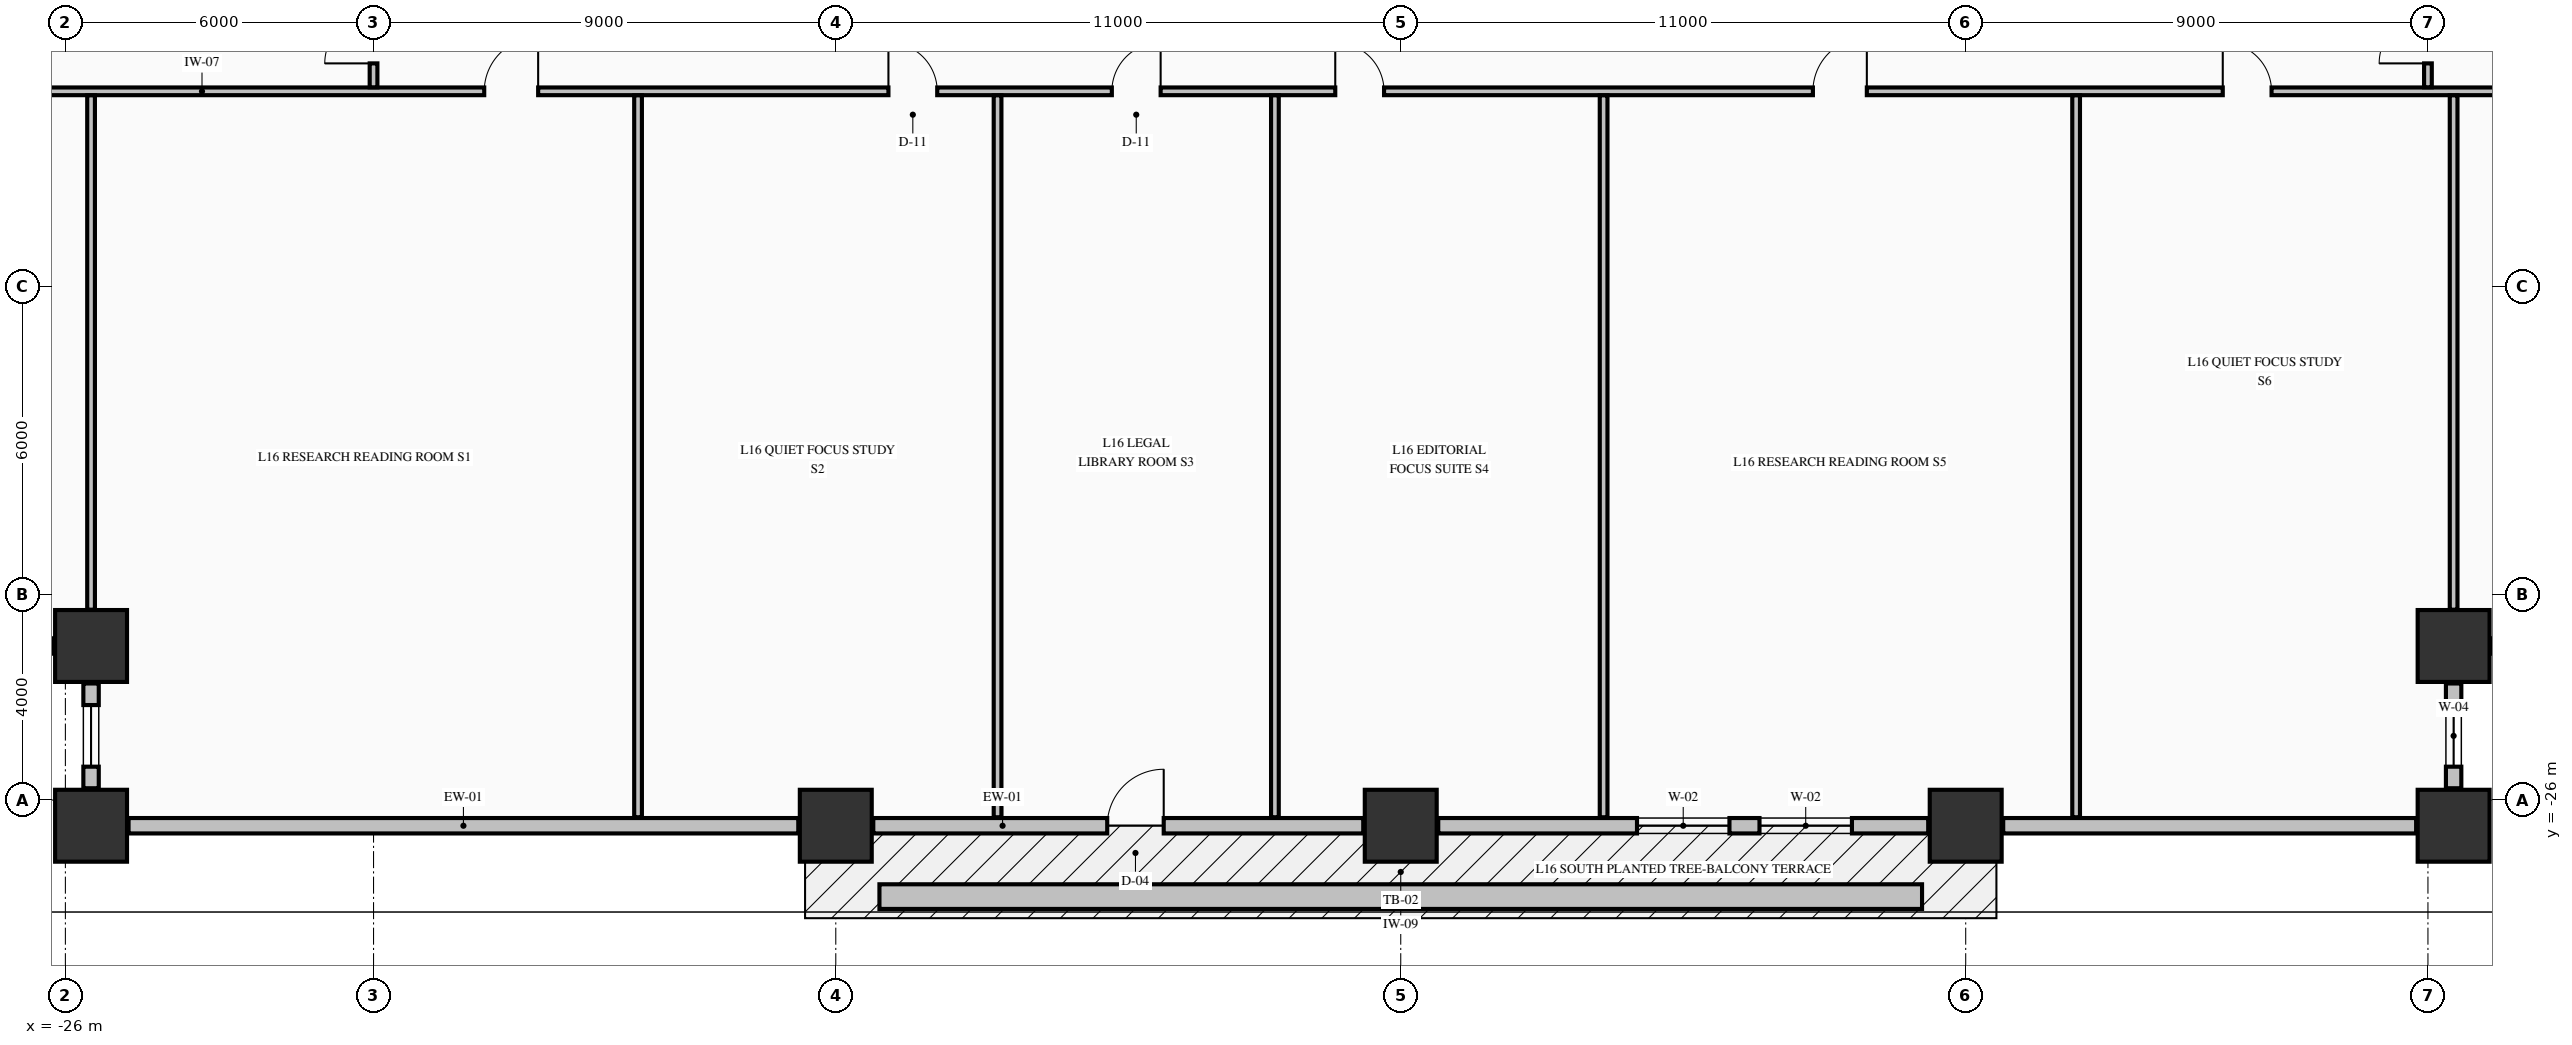
"""IFC4 building model, lengths in metres.
Left out: names, types, materials, properties, quantities, classifications, styles, units other than length and angle.
Written with IfcOpenShell. Run it as: python <this file> out.ifc"""

import sys

from ifc_helpers import new_model, si_unit, direction, frame, frame_2d, origin, origin_2d, place, context, subcontext, project, spatial, rectangle, extrude, element, fill, save


model = new_model("IFC4")
c1 = context("Model", 3, precision=1e-05, world=origin(), true_north=direction((0.0, 1.0)))
c2 = subcontext(c1, "Body", "Model", "MODEL_VIEW")
j1 = project(units=[si_unit("LENGTHUNIT", "METRE"), si_unit("PLANEANGLEUNIT", "RADIAN")], contexts=[c1])
p1 = place(None, origin())
s1 = spatial("IfcSite", under=j1, at=p1, CompositionType="ELEMENT")
p2 = place(p1, origin())
s2 = spatial("IfcBuilding", under=s1, at=p2, CompositionType="ELEMENT")
p3 = place(p2, frame((0.0, 0.0, 67.9)))
s3 = spatial("IfcBuildingStorey", under=s2, at=p3, CompositionType="ELEMENT", Elevation=67.9)
for number, where, z_axis, x_axis in (
    (1, (-25.5, -26.5, -0.25), (0.0, 0.0, 1.0), (1.0, 0.0, 0.0)),
    (2, (-11.0, -26.5, -0.25), (0.0, 0.0, 1.0), (1.0, 0.0, 0.0)),
    (3, (0.0, -26.5, -0.25), (0.0, 0.0, 1.0), (1.0, 0.0, 0.0)),
    (4, (11.0, -26.5, -0.25), (0.0, 0.0, 1.0), (1.0, 0.0, 0.0)),
    (5, (20.5, -26.5, -0.25), (0.0, 0.0, 1.0), (1.0, 0.0, 0.0)),
    (6, (-25.5, -23.0, -0.25), (0.0, 0.0, 1.0), (1.0, 0.0, 0.0)),
    (7, (20.5, -23.0, -0.25), (0.0, 0.0, 1.0), (1.0, 0.0, 0.0)),
):
    element("IfcColumn", number, at=place(p3, frame(where, z_axis=z_axis, x_axis=x_axis)), inside=s3, PredefinedType="COLUMN", context=c2, shape_type="SweptSolid", body=[
        extrude(rectangle(XDim=1.4, YDim=1.4, at=origin_2d()), origin(), (0.0, 0.0, 1.0), 3.495),
    ])
p4 = place(p3, frame((20.5, -25.77, 0.0), z_axis=(0.0, 0.0, 1.0), x_axis=(0.0, 1.0, 0.0)))
e8 = element("IfcWall", 8, at=p4, inside=s3, PredefinedType="STANDARD", context=c2, shape_type="SweptSolid", body=[
    extrude(rectangle(XDim=2.04, YDim=0.3, at=frame_2d((1.02, 0.0))), origin(), (0.0, 0.0, 1.0), 2.637),
])
p5 = place(p4, frame((0.42, 0.0, 0.82)))
e9 = element("IfcOpeningElement", 9, at=p5, cuts=e8, PredefinedType="OPENING", context=c2, shape_type="SweptSolid", body=[
    extrude(rectangle(XDim=1.2, YDim=1.65, at=frame_2d((0.6, 0.825))), frame((0.0, 0.16, 0.0), z_axis=(0.0, -1.0, 0.0), x_axis=(1.0, 0.0, 0.0)), (0.0, 0.0, 1.0), 0.32),
])
p6 = place(p3, frame((21.23, -23.0, 0.0), z_axis=(0.0, 0.0, 1.0), x_axis=(1.0, 0.0, 0.0)))
e10 = element("IfcWall", 10, at=p6, inside=s3, PredefinedType="STANDARD", context=c2, shape_type="SweptSolid", body=[
    extrude(rectangle(XDim=2.04, YDim=0.3, at=frame_2d((1.02, 0.0))), origin(), (0.0, 0.0, 1.0), 2.637),
])
p7 = place(p6, frame((0.42, 0.0, 0.82)))
e11 = element("IfcOpeningElement", 11, at=p7, cuts=e10, PredefinedType="OPENING", context=c2, shape_type="SweptSolid", body=[
    extrude(rectangle(XDim=1.2, YDim=1.65, at=frame_2d((0.6, 0.825))), frame((0.0, 0.16, 0.0), z_axis=(0.0, -1.0, 0.0), x_axis=(1.0, 0.0, 0.0)), (0.0, 0.0, 1.0), 0.32),
])
p8 = place(p3, frame((-28.27, -23.0, 0.0), z_axis=(0.0, 0.0, 1.0), x_axis=(1.0, 0.0, 0.0)))
e12 = element("IfcWall", 12, at=p8, inside=s3, PredefinedType="STANDARD", context=c2, shape_type="SweptSolid", body=[
    extrude(rectangle(XDim=2.04, YDim=0.3, at=frame_2d((1.02, 0.0))), origin(), (0.0, 0.0, 1.0), 2.637),
])
p9 = place(p8, frame((0.42, 0.0, 0.82)))
e13 = element("IfcOpeningElement", 13, at=p9, cuts=e12, PredefinedType="OPENING", context=c2, shape_type="SweptSolid", body=[
    extrude(rectangle(XDim=1.2, YDim=1.65, at=frame_2d((0.6, 0.825))), frame((0.0, 0.16, 0.0), z_axis=(0.0, -1.0, 0.0), x_axis=(1.0, 0.0, 0.0)), (0.0, 0.0, 1.0), 0.32),
])
p10 = place(p3, frame((-25.5, -23.73, 0.0), z_axis=(0.0, 0.0, 1.0), x_axis=(0.0, -1.0, 0.0)))
e14 = element("IfcWall", 14, at=p10, inside=s3, PredefinedType="STANDARD", context=c2, shape_type="SweptSolid", body=[
    extrude(rectangle(XDim=2.04, YDim=0.3, at=frame_2d((1.02, 0.0))), origin(), (0.0, 0.0, 1.0), 2.637),
])
p11 = place(p10, frame((0.42, 0.0, 0.82)))
e15 = element("IfcOpeningElement", 15, at=p11, cuts=e14, PredefinedType="OPENING", context=c2, shape_type="SweptSolid", body=[
    extrude(rectangle(XDim=1.2, YDim=1.65, at=frame_2d((0.6, 0.825))), frame((0.0, 0.16, 0.0), z_axis=(0.0, -1.0, 0.0), x_axis=(1.0, 0.0, 0.0)), (0.0, 0.0, 1.0), 0.32),
])
p12 = place(p3, frame((-24.77, -26.5, 0.0), z_axis=(0.0, 0.0, 1.0), x_axis=(1.0, 0.0, 0.0)))
e16 = element("IfcWall", 16, at=p12, inside=s3, PredefinedType="STANDARD", context=c2, shape_type="SweptSolid", body=[
    extrude(rectangle(XDim=13.04, YDim=0.3, at=frame_2d((6.52, 0.0))), origin(), (0.0, 0.0, 1.0), 2.637),
])
p13 = place(p3, frame((-10.27, -26.5, 0.0), z_axis=(0.0, 0.0, 1.0), x_axis=(1.0, 0.0, 0.0)))
e17 = element("IfcWall", 17, at=p13, inside=s3, PredefinedType="STANDARD", context=c2, shape_type="SweptSolid", body=[
    extrude(rectangle(XDim=9.54, YDim=0.3, at=frame_2d((4.77, 0.0))), origin(), (0.0, 0.0, 1.0), 2.637),
])
p14 = place(p13, frame((4.555, 0.0, 0.0)))
e18 = element("IfcOpeningElement", 18, at=p14, cuts=e17, PredefinedType="OPENING", context=c2, shape_type="SweptSolid", body=[
    extrude(rectangle(XDim=1.1, YDim=2.15, at=frame_2d((0.55, 1.075))), frame((0.0, 0.16, 0.0), z_axis=(0.0, -1.0, 0.0), x_axis=(1.0, 0.0, 0.0)), (0.0, 0.0, 1.0), 0.32),
])
p15 = place(p3, frame((0.73, -26.5, 0.0), z_axis=(0.0, 0.0, 1.0), x_axis=(1.0, 0.0, 0.0)))
e19 = element("IfcWall", 19, at=p15, inside=s3, PredefinedType="STANDARD", context=c2, shape_type="SweptSolid", body=[
    extrude(rectangle(XDim=9.54, YDim=0.3, at=frame_2d((4.77, 0.0))), origin(), (0.0, 0.0, 1.0), 2.637),
])
p16 = place(p15, frame((3.87, 0.0, 0.78)))
e20 = element("IfcOpeningElement", 20, at=p16, cuts=e19, PredefinedType="OPENING", context=c2, shape_type="SweptSolid", body=[
    extrude(rectangle(XDim=1.8, YDim=1.72, at=frame_2d((0.9, 0.86))), frame((0.0, 0.16, 0.0), z_axis=(0.0, -1.0, 0.0), x_axis=(1.0, 0.0, 0.0)), (0.0, 0.0, 1.0), 0.32),
])
p17 = place(p15, frame((6.255, 0.0, 0.78)))
e21 = element("IfcOpeningElement", 21, at=p17, cuts=e19, PredefinedType="OPENING", context=c2, shape_type="SweptSolid", body=[
    extrude(rectangle(XDim=1.8, YDim=1.72, at=frame_2d((0.9, 0.86))), frame((0.0, 0.16, 0.0), z_axis=(0.0, -1.0, 0.0), x_axis=(1.0, 0.0, 0.0)), (0.0, 0.0, 1.0), 0.32),
])
p18 = place(p3, frame((11.73, -26.5, 0.0), z_axis=(0.0, 0.0, 1.0), x_axis=(1.0, 0.0, 0.0)))
e22 = element("IfcWall", 22, at=p18, inside=s3, PredefinedType="STANDARD", context=c2, shape_type="SweptSolid", body=[
    extrude(rectangle(XDim=8.04, YDim=0.3, at=frame_2d((4.02, 0.0))), origin(), (0.0, 0.0, 1.0), 2.637),
])
p19 = place(p3, frame((-28.835, -12.2, 0.0), z_axis=(0.0, 0.0, 1.0), x_axis=(1.0, 0.0, 0.0)))
e23 = element("IfcWall", 23, at=p19, inside=s3, PredefinedType="PARTITIONING", context=c2, shape_type="SweptSolid", body=[
    extrude(rectangle(XDim=52.67, YDim=0.15, at=frame_2d((26.335, 0.0))), origin(), (0.0, 0.0, 1.0), 3.245),
])
p20 = place(p19, frame((10.99, 0.0, 0.0)))
e24 = element("IfcOpeningElement", 24, at=p20, cuts=e23, PredefinedType="OPENING", context=c2, shape_type="SweptSolid", body=[
    extrude(rectangle(XDim=1.05, YDim=2.15, at=frame_2d((0.525, 1.075))), frame((0.0, 0.085, 0.0), z_axis=(0.0, -1.0, 0.0), x_axis=(1.0, 0.0, 0.0)), (0.0, 0.0, 1.0), 0.17),
])
p21 = place(p19, frame((18.86, 0.0, 0.0)))
e25 = element("IfcOpeningElement", 25, at=p21, cuts=e23, PredefinedType="OPENING", context=c2, shape_type="SweptSolid", body=[
    extrude(rectangle(XDim=0.95, YDim=2.15, at=frame_2d((0.475, 1.075))), frame((0.0, 0.085, 0.0), z_axis=(0.0, -1.0, 0.0), x_axis=(1.0, 0.0, 0.0)), (0.0, 0.0, 1.0), 0.17),
])
p22 = place(p19, frame((23.21, 0.0, 0.0)))
e26 = element("IfcOpeningElement", 26, at=p22, cuts=e23, PredefinedType="OPENING", context=c2, shape_type="SweptSolid", body=[
    extrude(rectangle(XDim=0.95, YDim=2.15, at=frame_2d((0.475, 1.075))), frame((0.0, 0.085, 0.0), z_axis=(0.0, -1.0, 0.0), x_axis=(1.0, 0.0, 0.0)), (0.0, 0.0, 1.0), 0.17),
])
p23 = place(p19, frame((27.56, 0.0, 0.0)))
e27 = element("IfcOpeningElement", 27, at=p23, cuts=e23, PredefinedType="OPENING", context=c2, shape_type="SweptSolid", body=[
    extrude(rectangle(XDim=0.95, YDim=2.15, at=frame_2d((0.475, 1.075))), frame((0.0, 0.085, 0.0), z_axis=(0.0, -1.0, 0.0), x_axis=(1.0, 0.0, 0.0)), (0.0, 0.0, 1.0), 0.17),
])
p24 = place(p19, frame((36.86, 0.0, 0.0)))
e28 = element("IfcOpeningElement", 28, at=p24, cuts=e23, PredefinedType="OPENING", context=c2, shape_type="SweptSolid", body=[
    extrude(rectangle(XDim=1.05, YDim=2.15, at=frame_2d((0.525, 1.075))), frame((0.0, 0.085, 0.0), z_axis=(0.0, -1.0, 0.0), x_axis=(1.0, 0.0, 0.0)), (0.0, 0.0, 1.0), 0.17),
])
p25 = place(p19, frame((44.84, 0.0, 0.0)))
e29 = element("IfcOpeningElement", 29, at=p25, cuts=e23, PredefinedType="OPENING", context=c2, shape_type="SweptSolid", body=[
    extrude(rectangle(XDim=0.95, YDim=2.15, at=frame_2d((0.475, 1.075))), frame((0.0, 0.085, 0.0), z_axis=(0.0, -1.0, 0.0), x_axis=(1.0, 0.0, 0.0)), (0.0, 0.0, 1.0), 0.17),
])
p26 = place(p3, frame((-25.5, -22.294, 0.0), z_axis=(0.0, 0.0, 1.0), x_axis=(0.0, 1.0, 0.0)))
e30 = element("IfcWall", 30, at=p26, inside=s3, PredefinedType="PARTITIONING", context=c2, shape_type="SweptSolid", body=[
    extrude(rectangle(XDim=10.016, YDim=0.15, at=frame_2d((5.008, 0.0))), origin(), (0.0, 0.0, 1.0), 3.245),
])
p27 = place(p3, frame((-20.0, -12.122, 0.0), z_axis=(0.0, 0.0, 1.0), x_axis=(0.0, 1.0, 0.0)))
e31 = element("IfcWall", 31, at=p27, inside=s3, PredefinedType="PARTITIONING", context=c2, shape_type="SweptSolid", body=[
    extrude(rectangle(XDim=1.566, YDim=0.15, at=frame_2d((0.783, 0.0))), origin(), (0.0, 0.0, 1.0), 2.585),
])
p28 = place(p27, frame((0.466, 0.0, 0.0)))
e32 = element("IfcOpeningElement", 32, at=p28, cuts=e31, PredefinedType="OPENING", context=c2, shape_type="SweptSolid", body=[
    extrude(rectangle(XDim=0.95, YDim=2.15, at=frame_2d((0.475, 1.075))), frame((0.0, 0.085, 0.0), z_axis=(0.0, -1.0, 0.0), x_axis=(1.0, 0.0, 0.0)), (0.0, 0.0, 1.0), 0.17),
])
for number, where, z_axis, x_axis in (
    (33, (-14.85, -26.335, 0.0), (0.0, 0.0, 1.0), (0.0, 1.0, 0.0)),
    (34, (-7.85, -26.335, 0.0), (0.0, 0.0, 1.0), (0.0, 1.0, 0.0)),
    (35, (-2.45, -26.335, 0.0), (0.0, 0.0, 1.0), (0.0, 1.0, 0.0)),
    (36, (3.95, -26.335, 0.0), (0.0, 0.0, 1.0), (0.0, 1.0, 0.0)),
    (37, (13.15, -26.335, 0.0), (0.0, 0.0, 1.0), (0.0, 1.0, 0.0)),
):
    element("IfcWall", number, at=place(p3, frame(where, z_axis=z_axis, x_axis=x_axis)), inside=s3, PredefinedType="PARTITIONING", context=c2, shape_type="SweptSolid", body=[
        extrude(rectangle(XDim=14.057, YDim=0.15, at=frame_2d((7.028, 0.0))), origin(), (0.0, 0.0, 1.0), 3.245),
    ])
p29 = place(p3, frame((20.0, -12.122, 0.0), z_axis=(0.0, 0.0, 1.0), x_axis=(0.0, 1.0, 0.0)))
e38 = element("IfcWall", 38, at=p29, inside=s3, PredefinedType="PARTITIONING", context=c2, shape_type="SweptSolid", body=[
    extrude(rectangle(XDim=1.566, YDim=0.15, at=frame_2d((0.783, 0.0))), origin(), (0.0, 0.0, 1.0), 3.245),
])
p30 = place(p29, frame((0.466, 0.0, 0.0)))
e39 = element("IfcOpeningElement", 39, at=p30, cuts=e38, PredefinedType="OPENING", context=c2, shape_type="SweptSolid", body=[
    extrude(rectangle(XDim=0.95, YDim=2.15, at=frame_2d((0.475, 1.075))), frame((0.0, 0.085, 0.0), z_axis=(0.0, -1.0, 0.0), x_axis=(1.0, 0.0, 0.0)), (0.0, 0.0, 1.0), 0.17),
])
p31 = place(p3, frame((20.5, -22.294, 0.0), z_axis=(0.0, 0.0, 1.0), x_axis=(0.0, 1.0, 0.0)))
e40 = element("IfcWall", 40, at=p31, inside=s3, PredefinedType="PARTITIONING", context=c2, shape_type="SweptSolid", body=[
    extrude(rectangle(XDim=10.016, YDim=0.15, at=frame_2d((5.008, 0.0))), origin(), (0.0, 0.0, 1.0), 3.245),
])
p32 = place(p3, frame((-10.15, -27.88, -0.04), z_axis=(0.0, 0.0, 1.0), x_axis=(1.0, 0.0, 0.0)))
e41 = element("IfcWall", 41, at=p32, inside=s3, PredefinedType="PARAPET", context=c2, shape_type="SweptSolid", body=[
    extrude(rectangle(XDim=20.3, YDim=0.48, at=frame_2d((10.15, 0.0))), origin(), (0.0, 0.0, 1.0), 0.52),
])
p33 = place(p5, origin())
e42 = element("IfcWindow", 42, at=p33, inside=s3, PartitioningType="SINGLE_PANEL", PredefinedType="WINDOW", context=c2, shape_type="SweptSolid", body=[
    extrude(rectangle(XDim=1.2, YDim=1.65, at=frame_2d((0.6, 0.825))), frame((0.0, 0.03, 0.0), z_axis=(0.0, -1.0, 0.0), x_axis=(1.0, 0.0, 0.0)), (0.0, 0.0, 1.0), 0.06),
])
fill(e9, e42)
p34 = place(p11, origin())
e43 = element("IfcWindow", 43, at=p34, inside=s3, PartitioningType="SINGLE_PANEL", PredefinedType="WINDOW", context=c2, shape_type="SweptSolid", body=[
    extrude(rectangle(XDim=1.2, YDim=1.65, at=frame_2d((0.6, 0.825))), frame((0.0, 0.03, 0.0), z_axis=(0.0, -1.0, 0.0), x_axis=(1.0, 0.0, 0.0)), (0.0, 0.0, 1.0), 0.06),
])
fill(e15, e43)
p35 = place(p14, origin())
e44 = element("IfcDoor", 44, at=p35, inside=s3, OperationType="SINGLE_SWING_RIGHT", PredefinedType="DOOR", context=c2, shape_type="SweptSolid", body=[
    extrude(rectangle(XDim=1.1, YDim=2.15, at=frame_2d((0.55, 1.075))), frame((0.0, 0.025, 0.0), z_axis=(0.0, -1.0, 0.0), x_axis=(1.0, 0.0, 0.0)), (0.0, 0.0, 1.0), 0.05),
])
fill(e18, e44)
p36 = place(p16, origin())
e45 = element("IfcWindow", 45, at=p36, inside=s3, PartitioningType="SINGLE_PANEL", PredefinedType="WINDOW", context=c2, shape_type="SweptSolid", body=[
    extrude(rectangle(XDim=1.8, YDim=1.72, at=frame_2d((0.9, 0.86))), frame((0.0, 0.03, 0.0), z_axis=(0.0, -1.0, 0.0), x_axis=(1.0, 0.0, 0.0)), (0.0, 0.0, 1.0), 0.06),
])
fill(e20, e45)
p37 = place(p17, origin())
e46 = element("IfcWindow", 46, at=p37, inside=s3, PartitioningType="SINGLE_PANEL", PredefinedType="WINDOW", context=c2, shape_type="SweptSolid", body=[
    extrude(rectangle(XDim=1.8, YDim=1.72, at=frame_2d((0.9, 0.86))), frame((0.0, 0.03, 0.0), z_axis=(0.0, -1.0, 0.0), x_axis=(1.0, 0.0, 0.0)), (0.0, 0.0, 1.0), 0.06),
])
fill(e21, e46)
p38 = place(p20, origin())
e47 = element("IfcDoor", 47, at=p38, inside=s3, OperationType="SINGLE_SWING_RIGHT", PredefinedType="DOOR", context=c2, shape_type="SweptSolid", body=[
    extrude(rectangle(XDim=1.05, YDim=2.15, at=frame_2d((0.525, 1.075))), frame((0.0, 0.025, 0.0), z_axis=(0.0, -1.0, 0.0), x_axis=(1.0, 0.0, 0.0)), (0.0, 0.0, 1.0), 0.05),
])
fill(e24, e47)
p39 = place(p21, origin())
e48 = element("IfcDoor", 48, at=p39, inside=s3, OperationType="SINGLE_SWING_LEFT", PredefinedType="DOOR", context=c2, shape_type="SweptSolid", body=[
    extrude(rectangle(XDim=0.95, YDim=2.15, at=frame_2d((0.475, 1.075))), frame((0.0, 0.025, 0.0), z_axis=(0.0, -1.0, 0.0), x_axis=(1.0, 0.0, 0.0)), (0.0, 0.0, 1.0), 0.05),
])
fill(e25, e48)
p40 = place(p22, origin())
e49 = element("IfcDoor", 49, at=p40, inside=s3, OperationType="SINGLE_SWING_RIGHT", PredefinedType="DOOR", context=c2, shape_type="SweptSolid", body=[
    extrude(rectangle(XDim=0.95, YDim=2.15, at=frame_2d((0.475, 1.075))), frame((0.0, 0.025, 0.0), z_axis=(0.0, -1.0, 0.0), x_axis=(1.0, 0.0, 0.0)), (0.0, 0.0, 1.0), 0.05),
])
fill(e26, e49)
p41 = place(p23, origin())
e50 = element("IfcDoor", 50, at=p41, inside=s3, OperationType="SINGLE_SWING_LEFT", PredefinedType="DOOR", context=c2, shape_type="SweptSolid", body=[
    extrude(rectangle(XDim=0.95, YDim=2.15, at=frame_2d((0.475, 1.075))), frame((0.0, 0.025, 0.0), z_axis=(0.0, -1.0, 0.0), x_axis=(1.0, 0.0, 0.0)), (0.0, 0.0, 1.0), 0.05),
])
fill(e27, e50)
p42 = place(p24, origin())
e51 = element("IfcDoor", 51, at=p42, inside=s3, OperationType="SINGLE_SWING_RIGHT", PredefinedType="DOOR", context=c2, shape_type="SweptSolid", body=[
    extrude(rectangle(XDim=1.05, YDim=2.15, at=frame_2d((0.525, 1.075))), frame((0.0, 0.025, 0.0), z_axis=(0.0, -1.0, 0.0), x_axis=(1.0, 0.0, 0.0)), (0.0, 0.0, 1.0), 0.05),
])
fill(e28, e51)
p43 = place(p25, origin())
e52 = element("IfcDoor", 52, at=p43, inside=s3, OperationType="SINGLE_SWING_LEFT", PredefinedType="DOOR", context=c2, shape_type="SweptSolid", body=[
    extrude(rectangle(XDim=0.95, YDim=2.15, at=frame_2d((0.475, 1.075))), frame((0.0, 0.025, 0.0), z_axis=(0.0, -1.0, 0.0), x_axis=(1.0, 0.0, 0.0)), (0.0, 0.0, 1.0), 0.05),
])
fill(e29, e52)
p44 = place(p28, origin())
e53 = element("IfcDoor", 53, at=p44, inside=s3, OperationType="SINGLE_SWING_LEFT", PredefinedType="DOOR", context=c2, shape_type="SweptSolid", body=[
    extrude(rectangle(XDim=0.95, YDim=2.15, at=frame_2d((0.475, 1.075))), frame((0.0, 0.025, 0.0), z_axis=(0.0, -1.0, 0.0), x_axis=(1.0, 0.0, 0.0)), (0.0, 0.0, 1.0), 0.05),
])
fill(e32, e53)
p45 = place(p30, origin())
e54 = element("IfcDoor", 54, at=p45, inside=s3, OperationType="SINGLE_SWING_LEFT", PredefinedType="DOOR", context=c2, shape_type="SweptSolid", body=[
    extrude(rectangle(XDim=0.95, YDim=2.15, at=frame_2d((0.475, 1.075))), frame((0.0, 0.025, 0.0), z_axis=(0.0, -1.0, 0.0), x_axis=(1.0, 0.0, 0.0)), (0.0, 0.0, 1.0), 0.05),
])
fill(e39, e54)
save(model, sys.argv[1])
